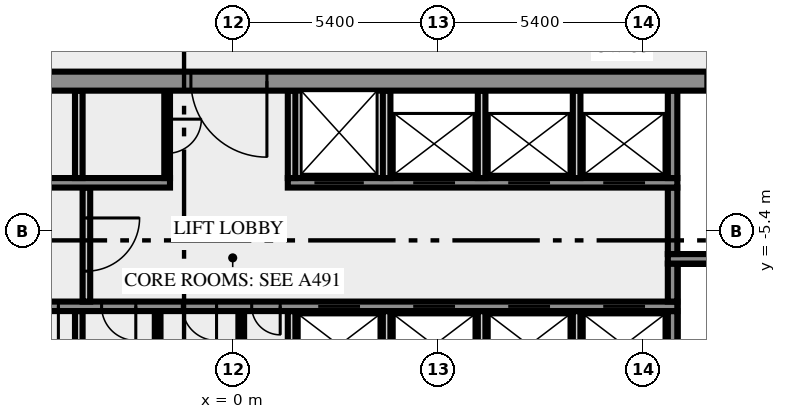
"""IFC4 building model, lengths in metres.
Left out: names, types, materials, properties, quantities, classifications, styles, units other than length and angle.
Written with IfcOpenShell. Run it as: python <this file> out.ifc"""

import sys

from ifc_helpers import new_model, si_unit, direction, frame, frame_2d, origin, place, context, subcontext, project, spatial, rectangle, extrude, element, fill, save


model = new_model("IFC4")
c1 = context("Model", 3, precision=1e-05, world=origin(), true_north=direction((0.0, 1.0)))
c2 = subcontext(c1, "Body", "Model", "MODEL_VIEW")
j1 = project(units=[si_unit("LENGTHUNIT", "METRE"), si_unit("PLANEANGLEUNIT", "RADIAN")], contexts=[c1])
p1 = place(None, origin())
s1 = spatial("IfcSite", under=j1, at=p1, CompositionType="ELEMENT")
p2 = place(p1, origin())
s2 = spatial("IfcBuilding", under=s1, at=p2, CompositionType="ELEMENT")
p3 = place(p2, frame((0.0, 0.0, 198.0)))
s3 = spatial("IfcBuildingStorey", under=s2, at=p3, CompositionType="ELEMENT", Elevation=198.0)
p4 = place(p3, frame((-4.05, -10.5, 0.0), z_axis=(0.0, 0.0, 1.0), x_axis=(0.0, 1.0, 0.0)))
e1 = element("IfcWall", 1, at=p4, inside=s3, PredefinedType="SOLIDWALL", context=c2, shape_type="SweptSolid", body=[
    extrude(rectangle(XDim=3.0, YDim=0.2, at=frame_2d((1.5, 0.0))), origin(), (0.0, 0.0, 1.0), 3.65),
])
for number, where, z_axis, x_axis in (
    (2, (-1.975, -10.5, 0.0), (0.0, 0.0, 1.0), (0.0, 1.0, 0.0)),
    (3, (0.225, -10.5, 0.0), (0.0, 0.0, 1.0), (0.0, 1.0, 0.0)),
):
    element("IfcWall", number, at=place(p3, frame(where, z_axis=z_axis, x_axis=x_axis)), inside=s3, PredefinedType="PARTITIONING", context=c2, shape_type="SweptSolid", body=[
        extrude(rectangle(XDim=3.0, YDim=0.15, at=frame_2d((1.5, 0.0))), origin(), (0.0, 0.0, 1.0), 3.65),
    ])
for number, where, z_axis, x_axis in (
    (4, (1.55, -10.5, 0.0), (0.0, 0.0, 1.0), (0.0, 1.0, 0.0)),
    (5, (4.05, -10.5, 0.0), (0.0, 0.0, 1.0), (0.0, 1.0, 0.0)),
    (6, (6.55, -10.5, 0.0), (0.0, 0.0, 1.0), (0.0, 1.0, 0.0)),
    (7, (9.05, -10.5, 0.0), (0.0, 0.0, 1.0), (0.0, 1.0, 0.0)),
):
    element("IfcWall", number, at=place(p3, frame(where, z_axis=z_axis, x_axis=x_axis)), inside=s3, PredefinedType="SOLIDWALL", context=c2, shape_type="SweptSolid", body=[
        extrude(rectangle(XDim=3.0, YDim=0.2, at=frame_2d((1.5, 0.0))), origin(), (0.0, 0.0, 1.0), 3.65),
    ])
p5 = place(p3, frame((11.575, -10.5, 0.0), z_axis=(0.0, 0.0, 1.0), x_axis=(0.0, 1.0, 0.0)))
e8 = element("IfcWall", 8, at=p5, inside=s3, PredefinedType="SHEAR", context=c2, shape_type="SweptSolid", body=[
    extrude(rectangle(XDim=3.0, YDim=0.25, at=frame_2d((1.5, 0.0))), origin(), (0.0, 0.0, 1.0), 3.65),
])
p6 = place(p3, frame((11.7, -7.375, 0.0), z_axis=(0.0, 0.0, 1.0), x_axis=(-1.0, 0.0, 0.0)))
e9 = element("IfcWall", 9, at=p6, inside=s3, PredefinedType="SHEAR", context=c2, shape_type="SweptSolid", body=[
    extrude(rectangle(XDim=23.4, YDim=0.25, at=frame_2d((11.7, 0.0))), origin(), (0.0, 0.0, 1.0), 3.65),
])
p7 = place(p6, frame((22.012, 0.0, 0.0)))
e10 = element("IfcOpeningElement", 10, at=p7, cuts=e9, PredefinedType="OPENING", context=c2, shape_type="SweptSolid", body=[
    extrude(rectangle(XDim=0.9, YDim=2.1, at=frame_2d((0.45, 1.05))), frame((0.0, 0.135, 0.0), z_axis=(0.0, -1.0, 0.0), x_axis=(1.0, 0.0, 0.0)), (0.0, 0.0, 1.0), 0.27),
])
p8 = place(p6, frame((20.25, 0.0, 0.0)))
e11 = element("IfcOpeningElement", 11, at=p8, cuts=e9, PredefinedType="OPENING", context=c2, shape_type="SweptSolid", body=[
    extrude(rectangle(XDim=0.9, YDim=2.1, at=frame_2d((0.45, 1.05))), frame((0.0, 0.135, 0.0), z_axis=(0.0, -1.0, 0.0), x_axis=(1.0, 0.0, 0.0)), (0.0, 0.0, 1.0), 0.27),
])
p9 = place(p6, frame((18.25, 0.0, 0.0)))
e12 = element("IfcOpeningElement", 12, at=p9, cuts=e9, PredefinedType="OPENING", context=c2, shape_type="SweptSolid", body=[
    extrude(rectangle(XDim=0.9, YDim=2.1, at=frame_2d((0.45, 1.05))), frame((0.0, 0.135, 0.0), z_axis=(0.0, -1.0, 0.0), x_axis=(1.0, 0.0, 0.0)), (0.0, 0.0, 1.0), 0.27),
])
p10 = place(p6, frame((16.287, 0.0, 0.0)))
e13 = element("IfcOpeningElement", 13, at=p10, cuts=e9, PredefinedType="OPENING", context=c2, shape_type="SweptSolid", body=[
    extrude(rectangle(XDim=0.9, YDim=2.1, at=frame_2d((0.45, 1.05))), frame((0.0, 0.135, 0.0), z_axis=(0.0, -1.0, 0.0), x_axis=(1.0, 0.0, 0.0)), (0.0, 0.0, 1.0), 0.27),
])
p11 = place(p6, frame((14.25, 0.0, 0.0)))
e14 = element("IfcOpeningElement", 14, at=p11, cuts=e9, PredefinedType="OPENING", context=c2, shape_type="SweptSolid", body=[
    extrude(rectangle(XDim=0.9, YDim=2.1, at=frame_2d((0.45, 1.05))), frame((0.0, 0.135, 0.0), z_axis=(0.0, -1.0, 0.0), x_axis=(1.0, 0.0, 0.0)), (0.0, 0.0, 1.0), 0.27),
])
p12 = place(p6, frame((12.125, 0.0, 0.0)))
e15 = element("IfcOpeningElement", 15, at=p12, cuts=e9, PredefinedType="OPENING", context=c2, shape_type="SweptSolid", body=[
    extrude(rectangle(XDim=0.9, YDim=2.1, at=frame_2d((0.45, 1.05))), frame((0.0, 0.135, 0.0), z_axis=(0.0, -1.0, 0.0), x_axis=(1.0, 0.0, 0.0)), (0.0, 0.0, 1.0), 0.27),
])
p13 = place(p6, frame((10.45, 0.0, 0.0)))
e16 = element("IfcOpeningElement", 16, at=p13, cuts=e9, PredefinedType="OPENING", context=c2, shape_type="SweptSolid", body=[
    extrude(rectangle(XDim=0.75, YDim=2.1, at=frame_2d((0.375, 1.05))), frame((0.0, 0.135, 0.0), z_axis=(0.0, -1.0, 0.0), x_axis=(1.0, 0.0, 0.0)), (0.0, 0.0, 1.0), 0.27),
])
p14 = place(p6, frame((8.35, 0.0, 0.0)))
e17 = element("IfcOpeningElement", 17, at=p14, cuts=e9, PredefinedType="OPENING", context=c2, shape_type="SweptSolid", body=[
    extrude(rectangle(XDim=1.1, YDim=2.1, at=frame_2d((0.55, 1.05))), frame((0.0, 0.135, 0.0), z_axis=(0.0, -1.0, 0.0), x_axis=(1.0, 0.0, 0.0)), (0.0, 0.0, 1.0), 0.27),
])
p15 = place(p6, frame((5.85, 0.0, 0.0)))
e18 = element("IfcOpeningElement", 18, at=p15, cuts=e9, PredefinedType="OPENING", context=c2, shape_type="SweptSolid", body=[
    extrude(rectangle(XDim=1.1, YDim=2.1, at=frame_2d((0.55, 1.05))), frame((0.0, 0.135, 0.0), z_axis=(0.0, -1.0, 0.0), x_axis=(1.0, 0.0, 0.0)), (0.0, 0.0, 1.0), 0.27),
])
p16 = place(p6, frame((3.35, 0.0, 0.0)))
e19 = element("IfcOpeningElement", 19, at=p16, cuts=e9, PredefinedType="OPENING", context=c2, shape_type="SweptSolid", body=[
    extrude(rectangle(XDim=1.1, YDim=2.1, at=frame_2d((0.55, 1.05))), frame((0.0, 0.135, 0.0), z_axis=(0.0, -1.0, 0.0), x_axis=(1.0, 0.0, 0.0)), (0.0, 0.0, 1.0), 0.27),
])
p17 = place(p6, frame((0.85, 0.0, 0.0)))
e20 = element("IfcOpeningElement", 20, at=p17, cuts=e9, PredefinedType="OPENING", context=c2, shape_type="SweptSolid", body=[
    extrude(rectangle(XDim=1.1, YDim=2.1, at=frame_2d((0.55, 1.05))), frame((0.0, 0.135, 0.0), z_axis=(0.0, -1.0, 0.0), x_axis=(1.0, 0.0, 0.0)), (0.0, 0.0, 1.0), 0.27),
])
p18 = place(p3, frame((-3.85, -4.25, 0.0), z_axis=(0.0, 0.0, 1.0), x_axis=(0.0, -1.0, 0.0)))
e21 = element("IfcWall", 21, at=p18, inside=s3, PredefinedType="SOLIDWALL", context=c2, shape_type="SweptSolid", body=[
    extrude(rectangle(XDim=3.0, YDim=0.2, at=frame_2d((1.5, 0.0))), origin(), (0.0, 0.0, 1.0), 3.65),
])
p19 = place(p18, frame((0.8, 0.0, 0.0)))
e22 = element("IfcOpeningElement", 22, at=p19, cuts=e21, PredefinedType="OPENING", context=c2, shape_type="SweptSolid", body=[
    extrude(rectangle(XDim=1.4, YDim=2.1, at=frame_2d((0.7, 1.05))), frame((0.0, 0.11, 0.0), z_axis=(0.0, -1.0, 0.0), x_axis=(1.0, 0.0, 0.0)), (0.0, 0.0, 1.0), 0.22),
])
p20 = place(p3, frame((11.575, -7.25, 0.0), z_axis=(0.0, 0.0, 1.0), x_axis=(0.0, 1.0, 0.0)))
e23 = element("IfcWall", 23, at=p20, inside=s3, PredefinedType="SHEAR", context=c2, shape_type="SweptSolid", body=[
    extrude(rectangle(XDim=1.0, YDim=0.25, at=frame_2d((0.5, 0.0))), origin(), (0.0, 0.0, 1.0), 3.65),
])
p21 = place(p3, frame((19.5, -6.125, 0.0), z_axis=(0.0, 0.0, 1.0), x_axis=(-1.0, 0.0, 0.0)))
e24 = element("IfcWall", 24, at=p21, inside=s3, PredefinedType="SHEAR", context=c2, shape_type="SweptSolid", body=[
    extrude(rectangle(XDim=8.05, YDim=0.25, at=frame_2d((4.025, 0.0))), origin(), (0.0, 0.0, 1.0), 3.65),
])
p22 = place(p21, frame((0.05, 0.0, 0.0)))
e25 = element("IfcOpeningElement", 25, at=p22, cuts=e24, PredefinedType="OPENING", context=c2, shape_type="SweptSolid", body=[
    extrude(rectangle(XDim=1.8, YDim=2.1, at=frame_2d((0.9, 1.05))), frame((0.0, 0.135, 0.0), z_axis=(0.0, -1.0, 0.0), x_axis=(1.0, 0.0, 0.0)), (0.0, 0.0, 1.0), 0.27),
])
p23 = place(p3, frame((11.575, -6.0, 0.0), z_axis=(0.0, 0.0, 1.0), x_axis=(0.0, 1.0, 0.0)))
e26 = element("IfcWall", 26, at=p23, inside=s3, PredefinedType="SHEAR", context=c2, shape_type="SweptSolid", body=[
    extrude(rectangle(XDim=1.75, YDim=0.25, at=frame_2d((0.875, 0.0))), origin(), (0.0, 0.0, 1.0), 3.65),
])
p24 = place(p3, frame((-11.7, -4.125, 0.0), z_axis=(0.0, 0.0, 1.0), x_axis=(1.0, 0.0, 0.0)))
e27 = element("IfcWall", 27, at=p24, inside=s3, PredefinedType="SHEAR", context=c2, shape_type="SweptSolid", body=[
    extrude(rectangle(XDim=10.05, YDim=0.25, at=frame_2d((5.025, 0.0))), origin(), (0.0, 0.0, 1.0), 3.65),
])
p25 = place(p3, frame((1.45, -4.125, 0.0), z_axis=(0.0, 0.0, 1.0), x_axis=(1.0, 0.0, 0.0)))
e28 = element("IfcWall", 28, at=p25, inside=s3, PredefinedType="SHEAR", context=c2, shape_type="SweptSolid", body=[
    extrude(rectangle(XDim=10.25, YDim=0.25, at=frame_2d((5.125, 0.0))), origin(), (0.0, 0.0, 1.0), 3.65),
])
p26 = place(p25, frame((0.7, 0.0, 0.0)))
e29 = element("IfcOpeningElement", 29, at=p26, cuts=e28, PredefinedType="OPENING", context=c2, shape_type="SweptSolid", body=[
    extrude(rectangle(XDim=1.3, YDim=2.1, at=frame_2d((0.65, 1.05))), frame((0.0, 0.135, 0.0), z_axis=(0.0, -1.0, 0.0), x_axis=(1.0, 0.0, 0.0)), (0.0, 0.0, 1.0), 0.27),
])
p27 = place(p25, frame((3.3, 0.0, 0.0)))
e30 = element("IfcOpeningElement", 30, at=p27, cuts=e28, PredefinedType="OPENING", context=c2, shape_type="SweptSolid", body=[
    extrude(rectangle(XDim=1.1, YDim=2.1, at=frame_2d((0.55, 1.05))), frame((0.0, 0.135, 0.0), z_axis=(0.0, -1.0, 0.0), x_axis=(1.0, 0.0, 0.0)), (0.0, 0.0, 1.0), 0.27),
])
p28 = place(p25, frame((5.8, 0.0, 0.0)))
e31 = element("IfcOpeningElement", 31, at=p28, cuts=e28, PredefinedType="OPENING", context=c2, shape_type="SweptSolid", body=[
    extrude(rectangle(XDim=1.1, YDim=2.1, at=frame_2d((0.55, 1.05))), frame((0.0, 0.135, 0.0), z_axis=(0.0, -1.0, 0.0), x_axis=(1.0, 0.0, 0.0)), (0.0, 0.0, 1.0), 0.27),
])
p29 = place(p25, frame((8.3, 0.0, 0.0)))
e32 = element("IfcOpeningElement", 32, at=p29, cuts=e28, PredefinedType="OPENING", context=c2, shape_type="SweptSolid", body=[
    extrude(rectangle(XDim=1.1, YDim=2.1, at=frame_2d((0.55, 1.05))), frame((0.0, 0.135, 0.0), z_axis=(0.0, -1.0, 0.0), x_axis=(1.0, 0.0, 0.0)), (0.0, 0.0, 1.0), 0.27),
])
p30 = place(p3, frame((-4.05, -4.0, 0.0), z_axis=(0.0, 0.0, 1.0), x_axis=(0.0, 1.0, 0.0)))
e33 = element("IfcWall", 33, at=p30, inside=s3, PredefinedType="SOLIDWALL", context=c2, shape_type="SweptSolid", body=[
    extrude(rectangle(XDim=2.3, YDim=0.2, at=frame_2d((1.15, 0.0))), origin(), (0.0, 0.0, 1.0), 3.65),
])
p31 = place(p3, frame((-1.725, -1.7, 0.0), z_axis=(0.0, 0.0, 1.0), x_axis=(0.0, -1.0, 0.0)))
e34 = element("IfcWall", 34, at=p31, inside=s3, PredefinedType="PARTITIONING", context=c2, shape_type="SweptSolid", body=[
    extrude(rectangle(XDim=2.3, YDim=0.15, at=frame_2d((1.15, 0.0))), origin(), (0.0, 0.0, 1.0), 3.65),
])
p32 = place(p31, frame((0.75, 0.0, 0.0)))
e35 = element("IfcOpeningElement", 35, at=p32, cuts=e34, PredefinedType="OPENING", context=c2, shape_type="SweptSolid", body=[
    extrude(rectangle(XDim=0.9, YDim=2.1, at=frame_2d((0.45, 1.05))), frame((0.0, 0.085, 0.0), z_axis=(0.0, -1.0, 0.0), x_axis=(1.0, 0.0, 0.0)), (0.0, 0.0, 1.0), 0.17),
])
for number, where, z_axis, x_axis in (
    (36, (1.55, -4.0, 0.0), (0.0, 0.0, 1.0), (0.0, 1.0, 0.0)),
    (37, (4.05, -4.0, 0.0), (0.0, 0.0, 1.0), (0.0, 1.0, 0.0)),
    (38, (6.55, -4.0, 0.0), (0.0, 0.0, 1.0), (0.0, 1.0, 0.0)),
    (39, (9.05, -4.0, 0.0), (0.0, 0.0, 1.0), (0.0, 1.0, 0.0)),
):
    element("IfcWall", number, at=place(p3, frame(where, z_axis=z_axis, x_axis=x_axis)), inside=s3, PredefinedType="SOLIDWALL", context=c2, shape_type="SweptSolid", body=[
        extrude(rectangle(XDim=2.3, YDim=0.2, at=frame_2d((1.15, 0.0))), origin(), (0.0, 0.0, 1.0), 3.65),
    ])
p33 = place(p3, frame((11.575, -4.0, 0.0), z_axis=(0.0, 0.0, 1.0), x_axis=(0.0, 1.0, 0.0)))
e40 = element("IfcWall", 40, at=p33, inside=s3, PredefinedType="SHEAR", context=c2, shape_type="SweptSolid", body=[
    extrude(rectangle(XDim=2.3, YDim=0.25, at=frame_2d((1.15, 0.0))), origin(), (0.0, 0.0, 1.0), 3.65),
])
p34 = place(p3, frame((20.49, -1.45, 0.0), z_axis=(0.0, 0.0, 1.0), x_axis=(-1.0, 0.0, 0.0)))
e41 = element("IfcWall", 41, at=p34, inside=s3, PredefinedType="SHEAR", context=c2, shape_type="SweptSolid", body=[
    extrude(rectangle(XDim=40.98, YDim=0.5, at=frame_2d((20.49, 0.0))), origin(), (0.0, 0.0, 1.0), 3.65),
])
p35 = place(p34, frame((38.14, 0.0, 0.0)))
e42 = element("IfcOpeningElement", 42, at=p35, cuts=e41, PredefinedType="OPENING", context=c2, shape_type="SweptSolid", body=[
    extrude(rectangle(XDim=1.8, YDim=2.1, at=frame_2d((0.9, 1.05))), frame((0.0, 0.26, 0.0), z_axis=(0.0, -1.0, 0.0), x_axis=(1.0, 0.0, 0.0)), (0.0, 0.0, 1.0), 0.52),
])
p36 = place(p34, frame((35.89, 0.0, 0.0)))
e43 = element("IfcOpeningElement", 43, at=p36, cuts=e41, PredefinedType="OPENING", context=c2, shape_type="SweptSolid", body=[
    extrude(rectangle(XDim=0.9, YDim=2.1, at=frame_2d((0.45, 1.05))), frame((0.0, 0.26, 0.0), z_axis=(0.0, -1.0, 0.0), x_axis=(1.0, 0.0, 0.0)), (0.0, 0.0, 1.0), 0.52),
])
p37 = place(p34, frame((32.94, 0.0, 0.0)))
e44 = element("IfcOpeningElement", 44, at=p37, cuts=e41, PredefinedType="OPENING", context=c2, shape_type="SweptSolid", body=[
    extrude(rectangle(XDim=0.9, YDim=2.1, at=frame_2d((0.45, 1.05))), frame((0.0, 0.26, 0.0), z_axis=(0.0, -1.0, 0.0), x_axis=(1.0, 0.0, 0.0)), (0.0, 0.0, 1.0), 0.52),
])
p38 = place(p34, frame((30.302, 0.0, 0.0)))
e45 = element("IfcOpeningElement", 45, at=p38, cuts=e41, PredefinedType="OPENING", context=c2, shape_type="SweptSolid", body=[
    extrude(rectangle(XDim=0.9, YDim=2.1, at=frame_2d((0.45, 1.05))), frame((0.0, 0.26, 0.0), z_axis=(0.0, -1.0, 0.0), x_axis=(1.0, 0.0, 0.0)), (0.0, 0.0, 1.0), 0.52),
])
p39 = place(p34, frame((26.577, 0.0, 0.0)))
e46 = element("IfcOpeningElement", 46, at=p39, cuts=e41, PredefinedType="OPENING", context=c2, shape_type="SweptSolid", body=[
    extrude(rectangle(XDim=0.9, YDim=2.1, at=frame_2d((0.45, 1.05))), frame((0.0, 0.26, 0.0), z_axis=(0.0, -1.0, 0.0), x_axis=(1.0, 0.0, 0.0)), (0.0, 0.0, 1.0), 0.52),
])
p40 = place(p34, frame((19.59, 0.0, 0.0)))
e47 = element("IfcOpeningElement", 47, at=p40, cuts=e41, PredefinedType="OPENING", context=c2, shape_type="SweptSolid", body=[
    extrude(rectangle(XDim=2.0, YDim=2.1, at=frame_2d((1.0, 1.05))), frame((0.0, 0.26, 0.0), z_axis=(0.0, -1.0, 0.0), x_axis=(1.0, 0.0, 0.0)), (0.0, 0.0, 1.0), 0.52),
])
p41 = place(p34, frame((7.14, 0.0, 0.0)))
e48 = element("IfcOpeningElement", 48, at=p41, cuts=e41, PredefinedType="OPENING", context=c2, shape_type="SweptSolid", body=[
    extrude(rectangle(XDim=0.9, YDim=2.1, at=frame_2d((0.45, 1.05))), frame((0.0, 0.26, 0.0), z_axis=(0.0, -1.0, 0.0), x_axis=(1.0, 0.0, 0.0)), (0.0, 0.0, 1.0), 0.52),
])
p42 = place(p34, frame((5.028, 0.0, 0.0)))
e49 = element("IfcOpeningElement", 49, at=p42, cuts=e41, PredefinedType="OPENING", context=c2, shape_type="SweptSolid", body=[
    extrude(rectangle(XDim=0.8, YDim=2.1, at=frame_2d((0.4, 1.05))), frame((0.0, 0.26, 0.0), z_axis=(0.0, -1.0, 0.0), x_axis=(1.0, 0.0, 0.0)), (0.0, 0.0, 1.0), 0.52),
])
p43 = place(p34, frame((3.452, 0.0, 0.0)))
e50 = element("IfcOpeningElement", 50, at=p43, cuts=e41, PredefinedType="OPENING", context=c2, shape_type="SweptSolid", body=[
    extrude(rectangle(XDim=0.8, YDim=2.1, at=frame_2d((0.4, 1.05))), frame((0.0, 0.26, 0.0), z_axis=(0.0, -1.0, 0.0), x_axis=(1.0, 0.0, 0.0)), (0.0, 0.0, 1.0), 0.52),
])
p44 = place(p34, frame((1.04, 0.0, 0.0)))
e51 = element("IfcOpeningElement", 51, at=p44, cuts=e41, PredefinedType="OPENING", context=c2, shape_type="SweptSolid", body=[
    extrude(rectangle(XDim=1.8, YDim=2.1, at=frame_2d((0.9, 1.05))), frame((0.0, 0.26, 0.0), z_axis=(0.0, -1.0, 0.0), x_axis=(1.0, 0.0, 0.0)), (0.0, 0.0, 1.0), 0.52),
])
p45 = place(p10, origin())
e52 = element("IfcDoor", 52, at=p45, inside=s3, OperationType="SINGLE_SWING_RIGHT", PredefinedType="DOOR", context=c2, shape_type="SweptSolid", body=[
    extrude(rectangle(XDim=0.9, YDim=2.1, at=frame_2d((0.45, 1.05))), frame((0.0, 0.025, 0.0), z_axis=(0.0, -1.0, 0.0), x_axis=(1.0, 0.0, 0.0)), (0.0, 0.0, 1.0), 0.05),
])
fill(e13, e52)
p46 = place(p11, origin())
e53 = element("IfcDoor", 53, at=p46, inside=s3, OperationType="SINGLE_SWING_RIGHT", PredefinedType="DOOR", context=c2, shape_type="SweptSolid", body=[
    extrude(rectangle(XDim=0.9, YDim=2.1, at=frame_2d((0.45, 1.05))), frame((0.0, 0.025, 0.0), z_axis=(0.0, -1.0, 0.0), x_axis=(1.0, 0.0, 0.0)), (0.0, 0.0, 1.0), 0.05),
])
fill(e14, e53)
p47 = place(p12, origin())
e54 = element("IfcDoor", 54, at=p47, inside=s3, OperationType="SINGLE_SWING_RIGHT", PredefinedType="DOOR", context=c2, shape_type="SweptSolid", body=[
    extrude(rectangle(XDim=0.9, YDim=2.1, at=frame_2d((0.45, 1.05))), frame((0.0, 0.025, 0.0), z_axis=(0.0, -1.0, 0.0), x_axis=(1.0, 0.0, 0.0)), (0.0, 0.0, 1.0), 0.05),
])
fill(e15, e54)
p48 = place(p13, origin())
e55 = element("IfcDoor", 55, at=p48, inside=s3, OperationType="SINGLE_SWING_LEFT", PredefinedType="DOOR", context=c2, shape_type="SweptSolid", body=[
    extrude(rectangle(XDim=0.75, YDim=2.1, at=frame_2d((0.375, 1.05))), frame((0.0, 0.025, 0.0), z_axis=(0.0, -1.0, 0.0), x_axis=(1.0, 0.0, 0.0)), (0.0, 0.0, 1.0), 0.05),
])
fill(e16, e55)
p49 = place(p14, origin())
e56 = element("IfcDoor", 56, at=p49, inside=s3, OperationType="DOUBLE_DOOR_SLIDING", PredefinedType="DOOR", context=c2, shape_type="SweptSolid", body=[
    extrude(rectangle(XDim=1.1, YDim=2.1, at=frame_2d((0.55, 1.05))), frame((0.0, 0.025, 0.0), z_axis=(0.0, -1.0, 0.0), x_axis=(1.0, 0.0, 0.0)), (0.0, 0.0, 1.0), 0.05),
])
fill(e17, e56)
p50 = place(p15, origin())
e57 = element("IfcDoor", 57, at=p50, inside=s3, OperationType="DOUBLE_DOOR_SLIDING", PredefinedType="DOOR", context=c2, shape_type="SweptSolid", body=[
    extrude(rectangle(XDim=1.1, YDim=2.1, at=frame_2d((0.55, 1.05))), frame((0.0, 0.025, 0.0), z_axis=(0.0, -1.0, 0.0), x_axis=(1.0, 0.0, 0.0)), (0.0, 0.0, 1.0), 0.05),
])
fill(e18, e57)
p51 = place(p16, origin())
e58 = element("IfcDoor", 58, at=p51, inside=s3, OperationType="DOUBLE_DOOR_SLIDING", PredefinedType="DOOR", context=c2, shape_type="SweptSolid", body=[
    extrude(rectangle(XDim=1.1, YDim=2.1, at=frame_2d((0.55, 1.05))), frame((0.0, 0.025, 0.0), z_axis=(0.0, -1.0, 0.0), x_axis=(1.0, 0.0, 0.0)), (0.0, 0.0, 1.0), 0.05),
])
fill(e19, e58)
p52 = place(p17, origin())
e59 = element("IfcDoor", 59, at=p52, inside=s3, OperationType="DOUBLE_DOOR_SLIDING", PredefinedType="DOOR", context=c2, shape_type="SweptSolid", body=[
    extrude(rectangle(XDim=1.1, YDim=2.1, at=frame_2d((0.55, 1.05))), frame((0.0, 0.025, 0.0), z_axis=(0.0, -1.0, 0.0), x_axis=(1.0, 0.0, 0.0)), (0.0, 0.0, 1.0), 0.05),
])
fill(e20, e59)
p53 = place(p19, origin())
e60 = element("IfcDoor", 60, at=p53, inside=s3, OperationType="DOUBLE_DOOR_SINGLE_SWING", PredefinedType="DOOR", context=c2, shape_type="SweptSolid", body=[
    extrude(rectangle(XDim=1.4, YDim=2.1, at=frame_2d((0.7, 1.05))), frame((0.0, 0.025, 0.0), z_axis=(0.0, -1.0, 0.0), x_axis=(1.0, 0.0, 0.0)), (0.0, 0.0, 1.0), 0.05),
])
fill(e22, e60)
p54 = place(p26, origin())
e61 = element("IfcDoor", 61, at=p54, inside=s3, OperationType="DOUBLE_DOOR_SLIDING", PredefinedType="DOOR", context=c2, shape_type="SweptSolid", body=[
    extrude(rectangle(XDim=1.3, YDim=2.1, at=frame_2d((0.65, 1.05))), frame((0.0, 0.025, 0.0), z_axis=(0.0, -1.0, 0.0), x_axis=(1.0, 0.0, 0.0)), (0.0, 0.0, 1.0), 0.05),
])
fill(e29, e61)
p55 = place(p27, origin())
e62 = element("IfcDoor", 62, at=p55, inside=s3, OperationType="DOUBLE_DOOR_SLIDING", PredefinedType="DOOR", context=c2, shape_type="SweptSolid", body=[
    extrude(rectangle(XDim=1.1, YDim=2.1, at=frame_2d((0.55, 1.05))), frame((0.0, 0.025, 0.0), z_axis=(0.0, -1.0, 0.0), x_axis=(1.0, 0.0, 0.0)), (0.0, 0.0, 1.0), 0.05),
])
fill(e30, e62)
p56 = place(p28, origin())
e63 = element("IfcDoor", 63, at=p56, inside=s3, OperationType="DOUBLE_DOOR_SLIDING", PredefinedType="DOOR", context=c2, shape_type="SweptSolid", body=[
    extrude(rectangle(XDim=1.1, YDim=2.1, at=frame_2d((0.55, 1.05))), frame((0.0, 0.025, 0.0), z_axis=(0.0, -1.0, 0.0), x_axis=(1.0, 0.0, 0.0)), (0.0, 0.0, 1.0), 0.05),
])
fill(e31, e63)
p57 = place(p29, origin())
e64 = element("IfcDoor", 64, at=p57, inside=s3, OperationType="DOUBLE_DOOR_SLIDING", PredefinedType="DOOR", context=c2, shape_type="SweptSolid", body=[
    extrude(rectangle(XDim=1.1, YDim=2.1, at=frame_2d((0.55, 1.05))), frame((0.0, 0.025, 0.0), z_axis=(0.0, -1.0, 0.0), x_axis=(1.0, 0.0, 0.0)), (0.0, 0.0, 1.0), 0.05),
])
fill(e32, e64)
p58 = place(p32, origin())
e65 = element("IfcDoor", 65, at=p58, inside=s3, OperationType="SINGLE_SWING_RIGHT", PredefinedType="DOOR", context=c2, shape_type="SweptSolid", body=[
    extrude(rectangle(XDim=0.9, YDim=2.1, at=frame_2d((0.45, 1.05))), frame((0.0, 0.025, 0.0), z_axis=(0.0, -1.0, 0.0), x_axis=(1.0, 0.0, 0.0)), (0.0, 0.0, 1.0), 0.05),
])
fill(e35, e65)
p59 = place(p40, origin())
e66 = element("IfcDoor", 66, at=p59, inside=s3, OperationType="DOUBLE_DOOR_SINGLE_SWING", PredefinedType="DOOR", context=c2, shape_type="SweptSolid", body=[
    extrude(rectangle(XDim=2.0, YDim=2.1, at=frame_2d((1.0, 1.05))), frame((0.0, 0.025, 0.0), z_axis=(0.0, -1.0, 0.0), x_axis=(1.0, 0.0, 0.0)), (0.0, 0.0, 1.0), 0.05),
])
fill(e47, e66)
save(model, sys.argv[1])
